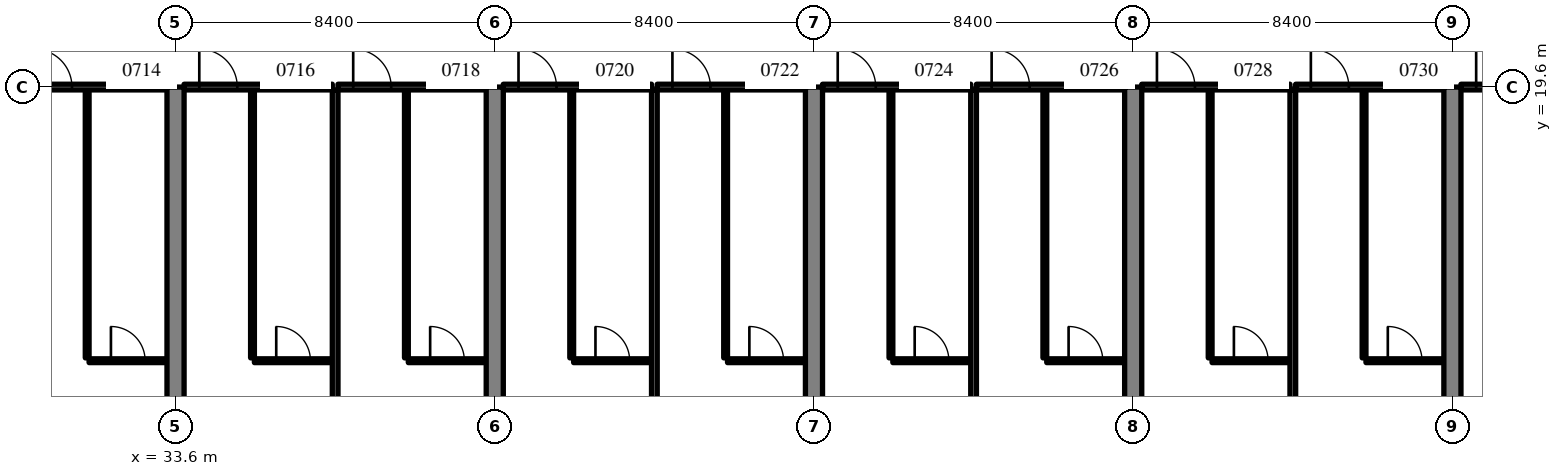
"""IFC4 building model, lengths in metres.
Left out: names, types, materials, properties, quantities, classifications, styles, units other than length and angle.
Written with IfcOpenShell. Run it as: python <this file> out.ifc"""

import sys

from ifc_helpers import new_model, si_unit, direction, frame, frame_2d, origin, place, context, subcontext, project, spatial, rectangle, extrude, source, transform, mapped, element, fill, save


model = new_model("IFC4")
c1 = context("Model", 3, precision=1e-05, world=origin(), true_north=direction((0.0, 1.0)))
c2 = subcontext(c1, "Body", "Model", "MODEL_VIEW")
j1 = project(units=[si_unit("LENGTHUNIT", "METRE"), si_unit("PLANEANGLEUNIT", "RADIAN")], contexts=[c1])
p1 = place(None, origin())
s1 = spatial("IfcSite", under=j1, at=p1, CompositionType="ELEMENT")
p2 = place(p1, origin())
s2 = spatial("IfcBuilding", under=s1, at=p2, CompositionType="ELEMENT")
p3 = place(p2, frame((0.0, 0.0, 35.4)))
s3 = spatial("IfcBuildingStorey", under=s2, at=p3, CompositionType="ELEMENT", Elevation=35.4)
m1 = source(origin(), c2, "Body", "SweptSolid", [
    extrude(rectangle(XDim=19.6, YDim=0.45, at=frame_2d((9.8, 0.0))), origin(), (0.0, 0.0, 1.0), 3.52),
])
for number, where, z_axis, x_axis in (
    (1, (33.6, 0.0, 0.0), (0.0, 0.0, 1.0), (0.0, 1.0, 0.0)),
    (2, (42.0, 0.0, 0.0), (0.0, 0.0, 1.0), (0.0, 1.0, 0.0)),
):
    element("IfcWall", number, at=place(p3, frame(where, z_axis=z_axis, x_axis=x_axis)), inside=s3, PredefinedType="SHEAR", context=c2, shape_type="MappedRepresentation", body=[
        mapped(m1, transform((0.0, 0.0, 0.0), scale=1.0)),
    ])
m2 = source(origin(), c2, "Body", "SweptSolid", [
    extrude(rectangle(XDim=18.6, YDim=0.45, at=frame_2d((9.3, 0.0))), origin(), (0.0, 0.0, 1.0), 3.52),
])
p4 = place(p3, frame((50.4, 1.0, 0.0), z_axis=(0.0, 0.0, 1.0), x_axis=(0.0, 1.0, 0.0)))
e3 = element("IfcWall", 3, at=p4, inside=s3, PredefinedType="SHEAR", context=c2, shape_type="MappedRepresentation", body=[
    mapped(m2, transform((0.0, 0.0, 0.0), scale=1.0)),
])
for number, where, z_axis, x_axis in (
    (4, (58.8, 0.0, 0.0), (0.0, 0.0, 1.0), (0.0, 1.0, 0.0)),
    (5, (67.2, 0.0, 0.0), (0.0, 0.0, 1.0), (0.0, 1.0, 0.0)),
):
    element("IfcWall", number, at=place(p3, frame(where, z_axis=z_axis, x_axis=x_axis)), inside=s3, PredefinedType="SHEAR", context=c2, shape_type="MappedRepresentation", body=[
        mapped(m1, transform((0.0, 0.0, 0.0), scale=1.0)),
    ])
m3 = source(origin(), c2, "Body", "SweptSolid", [
    extrude(rectangle(XDim=7.05, YDim=0.1, at=frame_2d((3.525, 0.0))), origin(), (0.0, 0.0, 1.0), 3.52),
])
p5 = place(p3, frame((31.275, 12.475, 0.0), z_axis=(0.0, 0.0, 1.0), x_axis=(0.0, 1.0, 0.0)))
e6 = element("IfcWall", 6, at=p5, inside=s3, PredefinedType="PARTITIONING", context=c2, shape_type="MappedRepresentation", body=[
    mapped(m3, transform((0.0, 0.0, 0.0), scale=1.0)),
])
m4 = source(origin(), c2, "Body", "SweptSolid", [
    extrude(rectangle(XDim=2.05, YDim=0.1, at=frame_2d((1.025, 0.0))), origin(), (0.0, 0.0, 1.0), 3.52),
])
p6 = place(p3, frame((31.325, 12.4, 0.0), z_axis=(0.0, 0.0, 1.0), x_axis=(1.0, 0.0, 0.0)))
e7 = element("IfcWall", 7, at=p6, inside=s3, PredefinedType="PARTITIONING", context=c2, shape_type="MappedRepresentation", body=[
    mapped(m4, transform((0.0, 0.0, 0.0), scale=1.0)),
])
m5 = source(origin(), c2, "Body", "SweptSolid", [
    extrude(rectangle(XDim=0.9, YDim=2.1, at=frame_2d((0.45, 1.05))), frame((0.0, 0.06, 0.0), z_axis=(0.0, -1.0, 0.0), x_axis=(1.0, 0.0, 0.0)), (0.0, 0.0, 1.0), 0.12),
])
p7 = place(p6, frame((0.575, 0.0, 0.0)))
e8 = element("IfcOpeningElement", 8, at=p7, cuts=e7, PredefinedType="OPENING", context=c2, shape_type="MappedRepresentation", body=[
    mapped(m5, transform((0.0, 0.0, 0.0), scale=1.0)),
])
m6 = source(origin(), c2, "Body", "SweptSolid", [
    extrude(rectangle(XDim=3.9, YDim=0.15, at=frame_2d((1.95, 0.0))), origin(), (0.0, 0.0, 1.0), 2.82),
])
p8 = place(p3, frame((29.475, 19.6, 0.0), z_axis=(0.0, 0.0, 1.0), x_axis=(1.0, 0.0, 0.0)))
e9 = element("IfcWall", 9, at=p8, inside=s3, PredefinedType="PARTITIONING", context=c2, shape_type="MappedRepresentation", body=[
    mapped(m6, transform((0.0, 0.0, 0.0), scale=1.0)),
])
m7 = source(origin(), c2, "Body", "SweptSolid", [
    extrude(rectangle(XDim=1.0, YDim=2.1, at=frame_2d((0.5, 1.05))), frame((0.0, 0.085, 0.0), z_axis=(0.0, -1.0, 0.0), x_axis=(1.0, 0.0, 0.0)), (0.0, 0.0, 1.0), 0.17),
])
p9 = place(p8, frame((0.4, 0.0, 0.0)))
e10 = element("IfcOpeningElement", 10, at=p9, cuts=e9, PredefinedType="OPENING", context=c2, shape_type="MappedRepresentation", body=[
    mapped(m7, transform((0.0, 0.0, 0.0), scale=1.0)),
])
p10 = place(p3, frame((35.625, 12.475, 0.0), z_axis=(0.0, 0.0, 1.0), x_axis=(0.0, 1.0, 0.0)))
e11 = element("IfcWall", 11, at=p10, inside=s3, PredefinedType="PARTITIONING", context=c2, shape_type="MappedRepresentation", body=[
    mapped(m3, transform((0.0, 0.0, 0.0), scale=1.0)),
])
p11 = place(p3, frame((35.675, 12.4, 0.0), z_axis=(0.0, 0.0, 1.0), x_axis=(1.0, 0.0, 0.0)))
e12 = element("IfcWall", 12, at=p11, inside=s3, PredefinedType="PARTITIONING", context=c2, shape_type="MappedRepresentation", body=[
    mapped(m4, transform((0.0, 0.0, 0.0), scale=1.0)),
])
p12 = place(p11, frame((0.575, 0.0, 0.0)))
e13 = element("IfcOpeningElement", 13, at=p12, cuts=e12, PredefinedType="OPENING", context=c2, shape_type="MappedRepresentation", body=[
    mapped(m5, transform((0.0, 0.0, 0.0), scale=1.0)),
])
m8 = source(origin(), c2, "Body", "SweptSolid", [
    extrude(rectangle(XDim=3.9, YDim=0.15, at=frame_2d((1.95, 0.0))), origin(), (0.0, 0.0, 1.0), 2.82),
])
p13 = place(p3, frame((33.825, 19.6, 0.0), z_axis=(0.0, 0.0, 1.0), x_axis=(1.0, 0.0, 0.0)))
e14 = element("IfcWall", 14, at=p13, inside=s3, PredefinedType="PARTITIONING", context=c2, shape_type="MappedRepresentation", body=[
    mapped(m8, transform((0.0, 0.0, 0.0), scale=1.0)),
])
p14 = place(p13, frame((0.4, 0.0, 0.0)))
e15 = element("IfcOpeningElement", 15, at=p14, cuts=e14, PredefinedType="OPENING", context=c2, shape_type="MappedRepresentation", body=[
    mapped(m7, transform((0.0, 0.0, 0.0), scale=1.0)),
])
p15 = place(p3, frame((39.675, 12.475, 0.0), z_axis=(0.0, 0.0, 1.0), x_axis=(0.0, 1.0, 0.0)))
e16 = element("IfcWall", 16, at=p15, inside=s3, PredefinedType="PARTITIONING", context=c2, shape_type="MappedRepresentation", body=[
    mapped(m3, transform((0.0, 0.0, 0.0), scale=1.0)),
])
m9 = source(origin(), c2, "Body", "SweptSolid", [
    extrude(rectangle(XDim=2.05, YDim=0.1, at=frame_2d((1.025, 0.0))), origin(), (0.0, 0.0, 1.0), 3.52),
])
p16 = place(p3, frame((39.725, 12.4, 0.0), z_axis=(0.0, 0.0, 1.0), x_axis=(1.0, 0.0, 0.0)))
e17 = element("IfcWall", 17, at=p16, inside=s3, PredefinedType="PARTITIONING", context=c2, shape_type="MappedRepresentation", body=[
    mapped(m9, transform((0.0, 0.0, 0.0), scale=1.0)),
])
p17 = place(p16, frame((0.575, 0.0, 0.0)))
e18 = element("IfcOpeningElement", 18, at=p17, cuts=e17, PredefinedType="OPENING", context=c2, shape_type="MappedRepresentation", body=[
    mapped(m5, transform((0.0, 0.0, 0.0), scale=1.0)),
])
p18 = place(p3, frame((37.875, 19.6, 0.0), z_axis=(0.0, 0.0, 1.0), x_axis=(1.0, 0.0, 0.0)))
e19 = element("IfcWall", 19, at=p18, inside=s3, PredefinedType="PARTITIONING", context=c2, shape_type="MappedRepresentation", body=[
    mapped(m6, transform((0.0, 0.0, 0.0), scale=1.0)),
])
p19 = place(p18, frame((0.4, 0.0, 0.0)))
e20 = element("IfcOpeningElement", 20, at=p19, cuts=e19, PredefinedType="OPENING", context=c2, shape_type="MappedRepresentation", body=[
    mapped(m7, transform((0.0, 0.0, 0.0), scale=1.0)),
])
m10 = source(origin(), c2, "Body", "SweptSolid", [
    extrude(rectangle(XDim=20.998, YDim=0.15, at=frame_2d((10.499, 0.0))), origin(), (0.0, 0.0, 1.0), 3.52),
])
p20 = place(p3, frame((37.8, -1.473, 0.0), z_axis=(0.0, 0.0, 1.0), x_axis=(0.0, 1.0, 0.0)))
e21 = element("IfcWall", 21, at=p20, inside=s3, PredefinedType="PARTITIONING", context=c2, shape_type="MappedRepresentation", body=[
    mapped(m10, transform((0.0, 0.0, 0.0), scale=1.0)),
])
p21 = place(p3, frame((44.025, 12.475, 0.0), z_axis=(0.0, 0.0, 1.0), x_axis=(0.0, 1.0, 0.0)))
e22 = element("IfcWall", 22, at=p21, inside=s3, PredefinedType="PARTITIONING", context=c2, shape_type="MappedRepresentation", body=[
    mapped(m3, transform((0.0, 0.0, 0.0), scale=1.0)),
])
p22 = place(p3, frame((44.075, 12.4, 0.0), z_axis=(0.0, 0.0, 1.0), x_axis=(1.0, 0.0, 0.0)))
e23 = element("IfcWall", 23, at=p22, inside=s3, PredefinedType="PARTITIONING", context=c2, shape_type="MappedRepresentation", body=[
    mapped(m4, transform((0.0, 0.0, 0.0), scale=1.0)),
])
p23 = place(p22, frame((0.575, 0.0, 0.0)))
e24 = element("IfcOpeningElement", 24, at=p23, cuts=e23, PredefinedType="OPENING", context=c2, shape_type="MappedRepresentation", body=[
    mapped(m5, transform((0.0, 0.0, 0.0), scale=1.0)),
])
p24 = place(p3, frame((42.225, 19.6, 0.0), z_axis=(0.0, 0.0, 1.0), x_axis=(1.0, 0.0, 0.0)))
e25 = element("IfcWall", 25, at=p24, inside=s3, PredefinedType="PARTITIONING", context=c2, shape_type="MappedRepresentation", body=[
    mapped(m6, transform((0.0, 0.0, 0.0), scale=1.0)),
])
p25 = place(p24, frame((0.4, 0.0, 0.0)))
e26 = element("IfcOpeningElement", 26, at=p25, cuts=e25, PredefinedType="OPENING", context=c2, shape_type="MappedRepresentation", body=[
    mapped(m7, transform((0.0, 0.0, 0.0), scale=1.0)),
])
p26 = place(p3, frame((48.075, 12.475, 0.0), z_axis=(0.0, 0.0, 1.0), x_axis=(0.0, 1.0, 0.0)))
e27 = element("IfcWall", 27, at=p26, inside=s3, PredefinedType="PARTITIONING", context=c2, shape_type="MappedRepresentation", body=[
    mapped(m3, transform((0.0, 0.0, 0.0), scale=1.0)),
])
p27 = place(p3, frame((48.125, 12.4, 0.0), z_axis=(0.0, 0.0, 1.0), x_axis=(1.0, 0.0, 0.0)))
e28 = element("IfcWall", 28, at=p27, inside=s3, PredefinedType="PARTITIONING", context=c2, shape_type="MappedRepresentation", body=[
    mapped(m4, transform((0.0, 0.0, 0.0), scale=1.0)),
])
p28 = place(p27, frame((0.575, 0.0, 0.0)))
e29 = element("IfcOpeningElement", 29, at=p28, cuts=e28, PredefinedType="OPENING", context=c2, shape_type="MappedRepresentation", body=[
    mapped(m5, transform((0.0, 0.0, 0.0), scale=1.0)),
])
p29 = place(p3, frame((46.275, 19.6, 0.0), z_axis=(0.0, 0.0, 1.0), x_axis=(1.0, 0.0, 0.0)))
e30 = element("IfcWall", 30, at=p29, inside=s3, PredefinedType="PARTITIONING", context=c2, shape_type="MappedRepresentation", body=[
    mapped(m8, transform((0.0, 0.0, 0.0), scale=1.0)),
])
p30 = place(p29, frame((0.4, 0.0, 0.0)))
e31 = element("IfcOpeningElement", 31, at=p30, cuts=e30, PredefinedType="OPENING", context=c2, shape_type="MappedRepresentation", body=[
    mapped(m7, transform((0.0, 0.0, 0.0), scale=1.0)),
])
m11 = source(origin(), c2, "Body", "SweptSolid", [
    extrude(rectangle(XDim=20.406, YDim=0.15, at=frame_2d((10.203, 0.0))), origin(), (0.0, 0.0, 1.0), 3.52),
])
p31 = place(p3, frame((46.2, -0.881, 0.0), z_axis=(0.0, 0.0, 1.0), x_axis=(0.0, 1.0, 0.0)))
e32 = element("IfcWall", 32, at=p31, inside=s3, PredefinedType="PARTITIONING", context=c2, shape_type="MappedRepresentation", body=[
    mapped(m11, transform((0.0, 0.0, 0.0), scale=1.0)),
])
p32 = place(p3, frame((52.425, 12.475, 0.0), z_axis=(0.0, 0.0, 1.0), x_axis=(0.0, 1.0, 0.0)))
e33 = element("IfcWall", 33, at=p32, inside=s3, PredefinedType="PARTITIONING", context=c2, shape_type="MappedRepresentation", body=[
    mapped(m3, transform((0.0, 0.0, 0.0), scale=1.0)),
])
p33 = place(p3, frame((52.475, 12.4, 0.0), z_axis=(0.0, 0.0, 1.0), x_axis=(1.0, 0.0, 0.0)))
e34 = element("IfcWall", 34, at=p33, inside=s3, PredefinedType="PARTITIONING", context=c2, shape_type="MappedRepresentation", body=[
    mapped(m9, transform((0.0, 0.0, 0.0), scale=1.0)),
])
p34 = place(p33, frame((0.575, 0.0, 0.0)))
e35 = element("IfcOpeningElement", 35, at=p34, cuts=e34, PredefinedType="OPENING", context=c2, shape_type="MappedRepresentation", body=[
    mapped(m5, transform((0.0, 0.0, 0.0), scale=1.0)),
])
p35 = place(p3, frame((50.625, 19.6, 0.0), z_axis=(0.0, 0.0, 1.0), x_axis=(1.0, 0.0, 0.0)))
e36 = element("IfcWall", 36, at=p35, inside=s3, PredefinedType="PARTITIONING", context=c2, shape_type="MappedRepresentation", body=[
    mapped(m6, transform((0.0, 0.0, 0.0), scale=1.0)),
])
p36 = place(p35, frame((0.4, 0.0, 0.0)))
e37 = element("IfcOpeningElement", 37, at=p36, cuts=e36, PredefinedType="OPENING", context=c2, shape_type="MappedRepresentation", body=[
    mapped(m7, transform((0.0, 0.0, 0.0), scale=1.0)),
])
p37 = place(p3, frame((56.475, 12.475, 0.0), z_axis=(0.0, 0.0, 1.0), x_axis=(0.0, 1.0, 0.0)))
e38 = element("IfcWall", 38, at=p37, inside=s3, PredefinedType="PARTITIONING", context=c2, shape_type="MappedRepresentation", body=[
    mapped(m3, transform((0.0, 0.0, 0.0), scale=1.0)),
])
p38 = place(p3, frame((56.525, 12.4, 0.0), z_axis=(0.0, 0.0, 1.0), x_axis=(1.0, 0.0, 0.0)))
e39 = element("IfcWall", 39, at=p38, inside=s3, PredefinedType="PARTITIONING", context=c2, shape_type="MappedRepresentation", body=[
    mapped(m4, transform((0.0, 0.0, 0.0), scale=1.0)),
])
p39 = place(p38, frame((0.575, 0.0, 0.0)))
e40 = element("IfcOpeningElement", 40, at=p39, cuts=e39, PredefinedType="OPENING", context=c2, shape_type="MappedRepresentation", body=[
    mapped(m5, transform((0.0, 0.0, 0.0), scale=1.0)),
])
p40 = place(p3, frame((54.675, 19.6, 0.0), z_axis=(0.0, 0.0, 1.0), x_axis=(1.0, 0.0, 0.0)))
e41 = element("IfcWall", 41, at=p40, inside=s3, PredefinedType="PARTITIONING", context=c2, shape_type="MappedRepresentation", body=[
    mapped(m6, transform((0.0, 0.0, 0.0), scale=1.0)),
])
p41 = place(p40, frame((0.4, 0.0, 0.0)))
e42 = element("IfcOpeningElement", 42, at=p41, cuts=e41, PredefinedType="OPENING", context=c2, shape_type="MappedRepresentation", body=[
    mapped(m7, transform((0.0, 0.0, 0.0), scale=1.0)),
])
p42 = place(p3, frame((54.6, -0.881, 0.0), z_axis=(0.0, 0.0, 1.0), x_axis=(0.0, 1.0, 0.0)))
e43 = element("IfcWall", 43, at=p42, inside=s3, PredefinedType="PARTITIONING", context=c2, shape_type="MappedRepresentation", body=[
    mapped(m11, transform((0.0, 0.0, 0.0), scale=1.0)),
])
p43 = place(p3, frame((60.825, 12.475, 0.0), z_axis=(0.0, 0.0, 1.0), x_axis=(0.0, 1.0, 0.0)))
e44 = element("IfcWall", 44, at=p43, inside=s3, PredefinedType="PARTITIONING", context=c2, shape_type="MappedRepresentation", body=[
    mapped(m3, transform((0.0, 0.0, 0.0), scale=1.0)),
])
p44 = place(p3, frame((60.875, 12.4, 0.0), z_axis=(0.0, 0.0, 1.0), x_axis=(1.0, 0.0, 0.0)))
e45 = element("IfcWall", 45, at=p44, inside=s3, PredefinedType="PARTITIONING", context=c2, shape_type="MappedRepresentation", body=[
    mapped(m4, transform((0.0, 0.0, 0.0), scale=1.0)),
])
p45 = place(p44, frame((0.575, 0.0, 0.0)))
e46 = element("IfcOpeningElement", 46, at=p45, cuts=e45, PredefinedType="OPENING", context=c2, shape_type="MappedRepresentation", body=[
    mapped(m5, transform((0.0, 0.0, 0.0), scale=1.0)),
])
p46 = place(p3, frame((59.025, 19.6, 0.0), z_axis=(0.0, 0.0, 1.0), x_axis=(1.0, 0.0, 0.0)))
e47 = element("IfcWall", 47, at=p46, inside=s3, PredefinedType="PARTITIONING", context=c2, shape_type="MappedRepresentation", body=[
    mapped(m8, transform((0.0, 0.0, 0.0), scale=1.0)),
])
p47 = place(p46, frame((0.4, 0.0, 0.0)))
e48 = element("IfcOpeningElement", 48, at=p47, cuts=e47, PredefinedType="OPENING", context=c2, shape_type="MappedRepresentation", body=[
    mapped(m7, transform((0.0, 0.0, 0.0), scale=1.0)),
])
p48 = place(p3, frame((64.875, 12.475, 0.0), z_axis=(0.0, 0.0, 1.0), x_axis=(0.0, 1.0, 0.0)))
e49 = element("IfcWall", 49, at=p48, inside=s3, PredefinedType="PARTITIONING", context=c2, shape_type="MappedRepresentation", body=[
    mapped(m3, transform((0.0, 0.0, 0.0), scale=1.0)),
])
p49 = place(p3, frame((64.925, 12.4, 0.0), z_axis=(0.0, 0.0, 1.0), x_axis=(1.0, 0.0, 0.0)))
e50 = element("IfcWall", 50, at=p49, inside=s3, PredefinedType="PARTITIONING", context=c2, shape_type="MappedRepresentation", body=[
    mapped(m4, transform((0.0, 0.0, 0.0), scale=1.0)),
])
p50 = place(p49, frame((0.575, 0.0, 0.0)))
e51 = element("IfcOpeningElement", 51, at=p50, cuts=e50, PredefinedType="OPENING", context=c2, shape_type="MappedRepresentation", body=[
    mapped(m5, transform((0.0, 0.0, 0.0), scale=1.0)),
])
p51 = place(p3, frame((63.075, 19.6, 0.0), z_axis=(0.0, 0.0, 1.0), x_axis=(1.0, 0.0, 0.0)))
e52 = element("IfcWall", 52, at=p51, inside=s3, PredefinedType="PARTITIONING", context=c2, shape_type="MappedRepresentation", body=[
    mapped(m8, transform((0.0, 0.0, 0.0), scale=1.0)),
])
p52 = place(p51, frame((0.4, 0.0, 0.0)))
e53 = element("IfcOpeningElement", 53, at=p52, cuts=e52, PredefinedType="OPENING", context=c2, shape_type="MappedRepresentation", body=[
    mapped(m7, transform((0.0, 0.0, 0.0), scale=1.0)),
])
p53 = place(p3, frame((63.0, -1.473, 0.0), z_axis=(0.0, 0.0, 1.0), x_axis=(0.0, 1.0, 0.0)))
e54 = element("IfcWall", 54, at=p53, inside=s3, PredefinedType="PARTITIONING", context=c2, shape_type="MappedRepresentation", body=[
    mapped(m10, transform((0.0, 0.0, 0.0), scale=1.0)),
])
p54 = place(p3, frame((67.425, 19.6, 0.0), z_axis=(0.0, 0.0, 1.0), x_axis=(1.0, 0.0, 0.0)))
e55 = element("IfcWall", 55, at=p54, inside=s3, PredefinedType="PARTITIONING", context=c2, shape_type="MappedRepresentation", body=[
    mapped(m6, transform((0.0, 0.0, 0.0), scale=1.0)),
])
p55 = place(p54, frame((0.4, 0.0, 0.0)))
e56 = element("IfcOpeningElement", 56, at=p55, cuts=e55, PredefinedType="OPENING", context=c2, shape_type="MappedRepresentation", body=[
    mapped(m7, transform((0.0, 0.0, 0.0), scale=1.0)),
])
m12 = source(origin(), c2, "Body", "SweptSolid", [
    extrude(rectangle(XDim=0.9, YDim=2.1, at=frame_2d((0.45, 1.05))), frame((0.0, 0.025, 0.0), z_axis=(0.0, -1.0, 0.0), x_axis=(1.0, 0.0, 0.0)), (0.0, 0.0, 1.0), 0.05),
])
p56 = place(p7, origin())
e57 = element("IfcDoor", 57, at=p56, inside=s3, OperationType="SINGLE_SWING_LEFT", PredefinedType="DOOR", context=c2, shape_type="MappedRepresentation", body=[
    mapped(m12, transform((0.0, 0.0, 0.0), scale=1.0)),
])
fill(e8, e57)
m13 = source(origin(), c2, "Body", "SweptSolid", [
    extrude(rectangle(XDim=1.0, YDim=2.1, at=frame_2d((0.5, 1.05))), frame((0.0, 0.025, 0.0), z_axis=(0.0, -1.0, 0.0), x_axis=(1.0, 0.0, 0.0)), (0.0, 0.0, 1.0), 0.05),
])
p57 = place(p9, origin())
e58 = element("IfcDoor", 58, at=p57, inside=s3, OperationType="SINGLE_SWING_LEFT", PredefinedType="DOOR", context=c2, shape_type="MappedRepresentation", body=[
    mapped(m13, transform((0.0, 0.0, 0.0), scale=1.0)),
])
fill(e10, e58)
p58 = place(p12, origin())
e59 = element("IfcDoor", 59, at=p58, inside=s3, OperationType="SINGLE_SWING_LEFT", PredefinedType="DOOR", context=c2, shape_type="MappedRepresentation", body=[
    mapped(m12, transform((0.0, 0.0, 0.0), scale=1.0)),
])
fill(e13, e59)
p59 = place(p14, origin())
e60 = element("IfcDoor", 60, at=p59, inside=s3, OperationType="SINGLE_SWING_LEFT", PredefinedType="DOOR", context=c2, shape_type="MappedRepresentation", body=[
    mapped(m13, transform((0.0, 0.0, 0.0), scale=1.0)),
])
fill(e15, e60)
p60 = place(p17, origin())
e61 = element("IfcDoor", 61, at=p60, inside=s3, OperationType="SINGLE_SWING_LEFT", PredefinedType="DOOR", context=c2, shape_type="MappedRepresentation", body=[
    mapped(m12, transform((0.0, 0.0, 0.0), scale=1.0)),
])
fill(e18, e61)
p61 = place(p19, origin())
e62 = element("IfcDoor", 62, at=p61, inside=s3, OperationType="SINGLE_SWING_LEFT", PredefinedType="DOOR", context=c2, shape_type="MappedRepresentation", body=[
    mapped(m13, transform((0.0, 0.0, 0.0), scale=1.0)),
])
fill(e20, e62)
p62 = place(p23, origin())
e63 = element("IfcDoor", 63, at=p62, inside=s3, OperationType="SINGLE_SWING_LEFT", PredefinedType="DOOR", context=c2, shape_type="MappedRepresentation", body=[
    mapped(m12, transform((0.0, 0.0, 0.0), scale=1.0)),
])
fill(e24, e63)
p63 = place(p25, origin())
e64 = element("IfcDoor", 64, at=p63, inside=s3, OperationType="SINGLE_SWING_LEFT", PredefinedType="DOOR", context=c2, shape_type="MappedRepresentation", body=[
    mapped(m13, transform((0.0, 0.0, 0.0), scale=1.0)),
])
fill(e26, e64)
p64 = place(p28, origin())
e65 = element("IfcDoor", 65, at=p64, inside=s3, OperationType="SINGLE_SWING_LEFT", PredefinedType="DOOR", context=c2, shape_type="MappedRepresentation", body=[
    mapped(m12, transform((0.0, 0.0, 0.0), scale=1.0)),
])
fill(e29, e65)
p65 = place(p30, origin())
e66 = element("IfcDoor", 66, at=p65, inside=s3, OperationType="SINGLE_SWING_LEFT", PredefinedType="DOOR", context=c2, shape_type="MappedRepresentation", body=[
    mapped(m13, transform((0.0, 0.0, 0.0), scale=1.0)),
])
fill(e31, e66)
p66 = place(p34, origin())
e67 = element("IfcDoor", 67, at=p66, inside=s3, OperationType="SINGLE_SWING_LEFT", PredefinedType="DOOR", context=c2, shape_type="MappedRepresentation", body=[
    mapped(m12, transform((0.0, 0.0, 0.0), scale=1.0)),
])
fill(e35, e67)
p67 = place(p36, origin())
e68 = element("IfcDoor", 68, at=p67, inside=s3, OperationType="SINGLE_SWING_LEFT", PredefinedType="DOOR", context=c2, shape_type="MappedRepresentation", body=[
    mapped(m13, transform((0.0, 0.0, 0.0), scale=1.0)),
])
fill(e37, e68)
p68 = place(p39, origin())
e69 = element("IfcDoor", 69, at=p68, inside=s3, OperationType="SINGLE_SWING_LEFT", PredefinedType="DOOR", context=c2, shape_type="MappedRepresentation", body=[
    mapped(m12, transform((0.0, 0.0, 0.0), scale=1.0)),
])
fill(e40, e69)
p69 = place(p41, origin())
e70 = element("IfcDoor", 70, at=p69, inside=s3, OperationType="SINGLE_SWING_LEFT", PredefinedType="DOOR", context=c2, shape_type="MappedRepresentation", body=[
    mapped(m13, transform((0.0, 0.0, 0.0), scale=1.0)),
])
fill(e42, e70)
p70 = place(p45, origin())
e71 = element("IfcDoor", 71, at=p70, inside=s3, OperationType="SINGLE_SWING_LEFT", PredefinedType="DOOR", context=c2, shape_type="MappedRepresentation", body=[
    mapped(m12, transform((0.0, 0.0, 0.0), scale=1.0)),
])
fill(e46, e71)
p71 = place(p47, origin())
e72 = element("IfcDoor", 72, at=p71, inside=s3, OperationType="SINGLE_SWING_LEFT", PredefinedType="DOOR", context=c2, shape_type="MappedRepresentation", body=[
    mapped(m13, transform((0.0, 0.0, 0.0), scale=1.0)),
])
fill(e48, e72)
p72 = place(p50, origin())
e73 = element("IfcDoor", 73, at=p72, inside=s3, OperationType="SINGLE_SWING_LEFT", PredefinedType="DOOR", context=c2, shape_type="MappedRepresentation", body=[
    mapped(m12, transform((0.0, 0.0, 0.0), scale=1.0)),
])
fill(e51, e73)
p73 = place(p52, origin())
e74 = element("IfcDoor", 74, at=p73, inside=s3, OperationType="SINGLE_SWING_LEFT", PredefinedType="DOOR", context=c2, shape_type="MappedRepresentation", body=[
    mapped(m13, transform((0.0, 0.0, 0.0), scale=1.0)),
])
fill(e53, e74)
p74 = place(p55, origin())
e75 = element("IfcDoor", 75, at=p74, inside=s3, OperationType="SINGLE_SWING_LEFT", PredefinedType="DOOR", context=c2, shape_type="MappedRepresentation", body=[
    mapped(m13, transform((0.0, 0.0, 0.0), scale=1.0)),
])
fill(e56, e75)
save(model, sys.argv[1])
